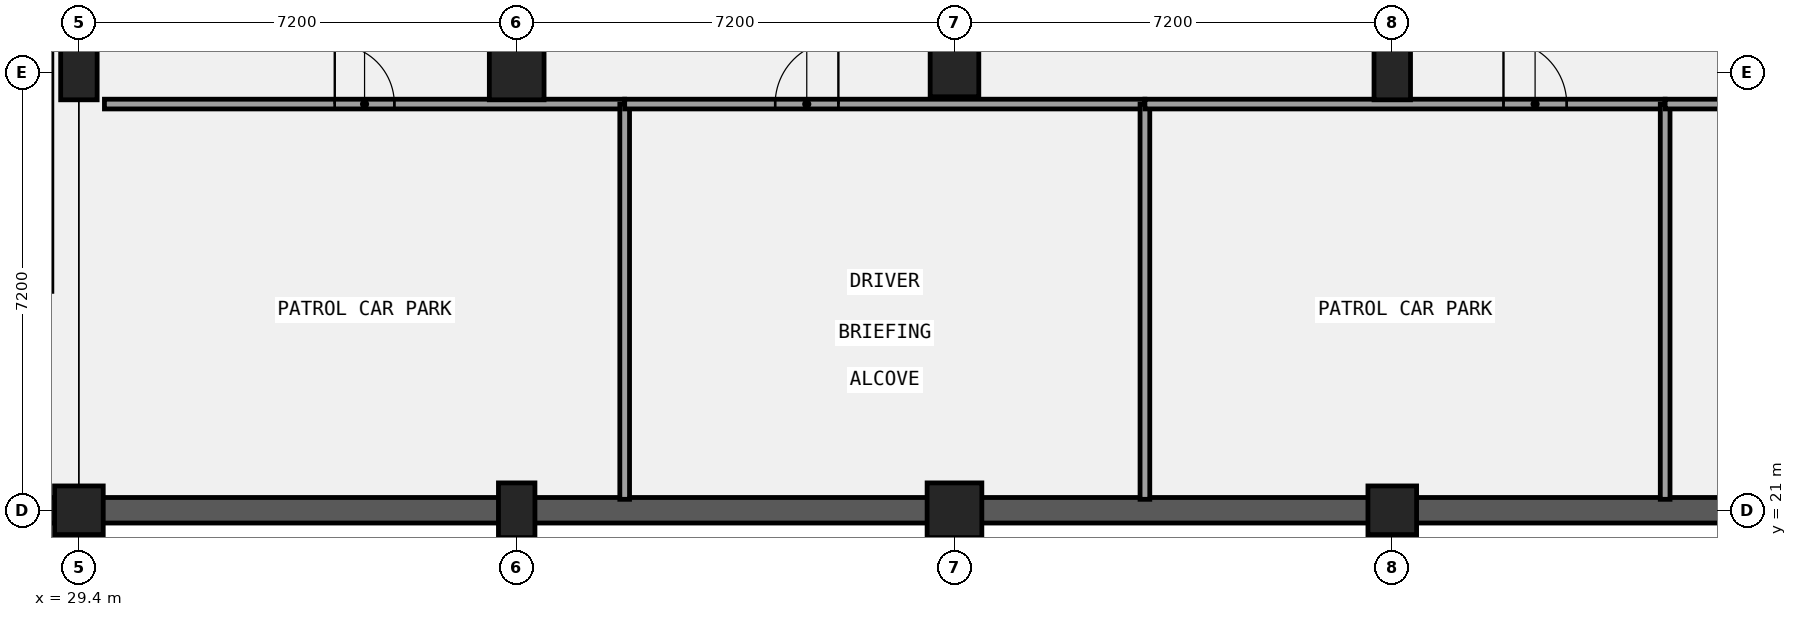
"""IFC4 building model, lengths in metres.
Left out: names, types, materials, properties, quantities, classifications, styles, units other than length and angle.
Written with IfcOpenShell. Run it as: python <this file> out.ifc"""

import sys

from ifc_helpers import new_model, si_unit, direction, frame, frame_2d, origin, origin_2d, place, context, subcontext, project, spatial, rectangle, extrude, element, fill, save


model = new_model("IFC4")
c1 = context("Model", 3, precision=1e-05, world=origin(), true_north=direction((0.0, 1.0)))
c2 = subcontext(c1, "Body", "Model", "MODEL_VIEW")
j1 = project(units=[si_unit("LENGTHUNIT", "METRE"), si_unit("PLANEANGLEUNIT", "RADIAN")], contexts=[c1])
p1 = place(None, origin())
s1 = spatial("IfcSite", under=j1, at=p1, CompositionType="ELEMENT")
p2 = place(p1, origin())
s2 = spatial("IfcBuilding", under=s1, at=p2, CompositionType="ELEMENT")
p3 = place(p2, frame((0.0, 0.0, -4.2)))
s3 = spatial("IfcBuildingStorey", under=s2, at=p3, CompositionType="ELEMENT", Elevation=-4.2)
p4 = place(p3, frame((29.61, 21.0, 0.0), z_axis=(0.0, 0.0, 1.0), x_axis=(-1.0, 0.0, 0.0)))
e1 = element("IfcWall", 1, at=p4, inside=s3, PredefinedType="USERDEFINED", context=c2, shape_type="SweptSolid", body=[
    extrude(rectangle(XDim=22.02, YDim=0.42, at=frame_2d((11.01, 0.0))), origin(), (0.0, 0.0, 1.0), 2.98),
])
p5 = place(p3, frame((144.81, 21.0, 0.0), z_axis=(0.0, 0.0, 1.0), x_axis=(-1.0, 0.0, 0.0)))
e2 = element("IfcWall", 2, at=p5, inside=s3, PredefinedType="USERDEFINED", context=c2, shape_type="SweptSolid", body=[
    extrude(rectangle(XDim=115.62, YDim=0.42, at=frame_2d((57.81, 0.0))), origin(), (0.0, 0.0, 1.0), 2.88),
])
p6 = place(p3, frame((29.4, 21.0, 0.0), z_axis=(0.0, 0.0, 1.0), x_axis=(1.0, 0.0, 0.0)))
e3 = element("IfcColumn", 3, at=p6, inside=s3, PredefinedType="COLUMN", context=c2, shape_type="SweptSolid", body=[
    extrude(rectangle(XDim=0.8, YDim=0.8, at=origin_2d()), origin(), (0.0, 0.0, 1.0), 4.2),
])
for number, where, z_axis, x_axis in (
    (4, (29.4, 28.2, 0.0), (0.0, 0.0, 1.0), (1.0, 0.0, 0.0)),
    (5, (36.6, 21.0, 0.0), (0.0, 0.0, 1.0), (1.0, 0.0, 0.0)),
):
    element("IfcColumn", number, at=place(p3, frame(where, z_axis=z_axis, x_axis=x_axis)), inside=s3, PredefinedType="COLUMN", context=c2, shape_type="SweptSolid", body=[
        extrude(rectangle(XDim=0.6, YDim=0.9, at=origin_2d()), origin(), (0.0, 0.0, 1.0), 4.2),
    ])
for number, where, z_axis, x_axis in (
    (6, (36.6, 28.2, 0.0), (0.0, 0.0, 1.0), (1.0, 0.0, 0.0)),
    (7, (43.8, 21.0, 0.0), (0.0, 0.0, 1.0), (1.0, 0.0, 0.0)),
):
    element("IfcColumn", number, at=place(p3, frame(where, z_axis=z_axis, x_axis=x_axis)), inside=s3, PredefinedType="COLUMN", context=c2, shape_type="SweptSolid", body=[
        extrude(rectangle(XDim=0.9, YDim=0.9, at=origin_2d()), origin(), (0.0, 0.0, 1.0), 4.2),
    ])
for number, where, z_axis, x_axis in (
    (8, (43.8, 28.2, 0.0), (0.0, 0.0, 1.0), (1.0, 0.0, 0.0)),
    (9, (51.0, 21.0, 0.0), (0.0, 0.0, 1.0), (1.0, 0.0, 0.0)),
):
    element("IfcColumn", number, at=place(p3, frame(where, z_axis=z_axis, x_axis=x_axis)), inside=s3, PredefinedType="COLUMN", context=c2, shape_type="SweptSolid", body=[
        extrude(rectangle(XDim=0.8, YDim=0.8, at=origin_2d()), origin(), (0.0, 0.0, 1.0), 4.2),
    ])
p7 = place(p3, frame((51.0, 28.2, 0.0), z_axis=(0.0, 0.0, 1.0), x_axis=(1.0, 0.0, 0.0)))
e10 = element("IfcColumn", 10, at=p7, inside=s3, PredefinedType="COLUMN", context=c2, shape_type="SweptSolid", body=[
    extrude(rectangle(XDim=0.6, YDim=0.9, at=origin_2d()), origin(), (0.0, 0.0, 1.0), 4.2),
])
p8 = place(p3, frame((29.82, 27.68, 0.0), z_axis=(0.0, 0.0, 1.0), x_axis=(1.0, 0.0, 0.0)))
e11 = element("IfcWall", 11, at=p8, inside=s3, PredefinedType="PARTITIONING", context=c2, shape_type="SweptSolid", body=[
    extrude(rectangle(XDim=8.556, YDim=0.16, at=frame_2d((4.278, 0.0))), origin(), (0.0, 0.0, 1.0), 3.88),
])
p9 = place(p8, frame((3.788, 0.0, 0.0)))
e12 = element("IfcOpeningElement", 12, at=p9, cuts=e11, PredefinedType="OPENING", context=c2, shape_type="SweptSolid", body=[
    extrude(rectangle(XDim=0.98, YDim=2.35, at=frame_2d((0.49, 1.175))), frame((0.0, 0.09, 0.0), z_axis=(0.0, -1.0, 0.0), x_axis=(1.0, 0.0, 0.0)), (0.0, 0.0, 1.0), 0.18),
])
p10 = place(p3, frame((38.376, 21.18, 0.0), z_axis=(0.0, 0.0, 1.0), x_axis=(0.0, 1.0, 0.0)))
e13 = element("IfcWall", 13, at=p10, inside=s3, PredefinedType="PARTITIONING", context=c2, shape_type="SweptSolid", body=[
    extrude(rectangle(XDim=6.5, YDim=0.16, at=frame_2d((3.25, 0.0))), origin(), (0.0, 0.0, 1.0), 3.88),
])
p11 = place(p3, frame((38.376, 27.68, 0.0), z_axis=(0.0, 0.0, 1.0), x_axis=(1.0, 0.0, 0.0)))
e14 = element("IfcWall", 14, at=p11, inside=s3, PredefinedType="PARTITIONING", context=c2, shape_type="SweptSolid", body=[
    extrude(rectangle(XDim=8.556, YDim=0.16, at=frame_2d((4.278, 0.0))), origin(), (0.0, 0.0, 1.0), 3.88),
])
p12 = place(p11, frame((2.475, 0.0, 0.0)))
e15 = element("IfcOpeningElement", 15, at=p12, cuts=e14, PredefinedType="OPENING", context=c2, shape_type="SweptSolid", body=[
    extrude(rectangle(XDim=1.04, YDim=2.1, at=frame_2d((0.52, 1.05))), frame((0.0, 0.09, 0.0), z_axis=(0.0, -1.0, 0.0), x_axis=(1.0, 0.0, 0.0)), (0.0, 0.0, 1.0), 0.18),
])
p13 = place(p3, frame((46.932, 21.18, 0.0), z_axis=(0.0, 0.0, 1.0), x_axis=(0.0, 1.0, 0.0)))
e16 = element("IfcWall", 16, at=p13, inside=s3, PredefinedType="PARTITIONING", context=c2, shape_type="SweptSolid", body=[
    extrude(rectangle(XDim=6.5, YDim=0.16, at=frame_2d((3.25, 0.0))), origin(), (0.0, 0.0, 1.0), 3.88),
])
p14 = place(p3, frame((46.932, 27.68, 0.0), z_axis=(0.0, 0.0, 1.0), x_axis=(1.0, 0.0, 0.0)))
e17 = element("IfcWall", 17, at=p14, inside=s3, PredefinedType="PARTITIONING", context=c2, shape_type="SweptSolid", body=[
    extrude(rectangle(XDim=8.556, YDim=0.16, at=frame_2d((4.278, 0.0))), origin(), (0.0, 0.0, 1.0), 3.88),
])
p15 = place(p14, frame((5.897, 0.0, 0.0)))
e18 = element("IfcOpeningElement", 18, at=p15, cuts=e17, PredefinedType="OPENING", context=c2, shape_type="SweptSolid", body=[
    extrude(rectangle(XDim=1.04, YDim=2.22, at=frame_2d((0.52, 1.11))), frame((0.0, 0.09, 0.0), z_axis=(0.0, -1.0, 0.0), x_axis=(1.0, 0.0, 0.0)), (0.0, 0.0, 1.0), 0.18),
])
p16 = place(p3, frame((55.488, 21.18, 0.0), z_axis=(0.0, 0.0, 1.0), x_axis=(0.0, 1.0, 0.0)))
e19 = element("IfcWall", 19, at=p16, inside=s3, PredefinedType="PARTITIONING", context=c2, shape_type="SweptSolid", body=[
    extrude(rectangle(XDim=6.5, YDim=0.16, at=frame_2d((3.25, 0.0))), origin(), (0.0, 0.0, 1.0), 3.88),
])
p17 = place(p3, frame((55.488, 27.68, 0.0), z_axis=(0.0, 0.0, 1.0), x_axis=(1.0, 0.0, 0.0)))
e20 = element("IfcWall", 20, at=p17, inside=s3, PredefinedType="PARTITIONING", context=c2, shape_type="SweptSolid", body=[
    extrude(rectangle(XDim=8.556, YDim=0.16, at=frame_2d((4.278, 0.0))), origin(), (0.0, 0.0, 1.0), 3.88),
])
p18 = place(p17, frame((5.042, 0.0, 0.0)))
e21 = element("IfcOpeningElement", 21, at=p18, cuts=e20, PredefinedType="OPENING", context=c2, shape_type="SweptSolid", body=[
    extrude(rectangle(XDim=1.04, YDim=2.35, at=frame_2d((0.52, 1.175))), frame((0.0, 0.09, 0.0), z_axis=(0.0, -1.0, 0.0), x_axis=(1.0, 0.0, 0.0)), (0.0, 0.0, 1.0), 0.18),
])
p19 = place(p9, frame((0.98, 0.0, 0.0), z_axis=(0.0, 0.0, 1.0), x_axis=(-1.0, 0.0, 0.0)))
e22 = element("IfcDoor", 22, at=p19, inside=s3, OperationType="SINGLE_SWING_LEFT", PredefinedType="DOOR", context=c2, shape_type="SweptSolid", body=[
    extrude(rectangle(XDim=0.98, YDim=2.35, at=frame_2d((0.49, 1.175))), frame((0.0, 0.025, 0.0), z_axis=(0.0, -1.0, 0.0), x_axis=(1.0, 0.0, 0.0)), (0.0, 0.0, 1.0), 0.05),
])
fill(e12, e22)
p20 = place(p12, frame((1.04, 0.0, 0.0), z_axis=(0.0, 0.0, 1.0), x_axis=(-1.0, 0.0, 0.0)))
e23 = element("IfcDoor", 23, at=p20, inside=s3, OperationType="SINGLE_SWING_RIGHT", PredefinedType="DOOR", context=c2, shape_type="SweptSolid", body=[
    extrude(rectangle(XDim=1.04, YDim=2.1, at=frame_2d((0.52, 1.05))), frame((0.0, 0.025, 0.0), z_axis=(0.0, -1.0, 0.0), x_axis=(1.0, 0.0, 0.0)), (0.0, 0.0, 1.0), 0.05),
])
fill(e15, e23)
p21 = place(p15, frame((1.04, 0.0, 0.0), z_axis=(0.0, 0.0, 1.0), x_axis=(-1.0, 0.0, 0.0)))
e24 = element("IfcDoor", 24, at=p21, inside=s3, OperationType="SINGLE_SWING_LEFT", PredefinedType="DOOR", context=c2, shape_type="SweptSolid", body=[
    extrude(rectangle(XDim=1.04, YDim=2.22, at=frame_2d((0.52, 1.11))), frame((0.0, 0.025, 0.0), z_axis=(0.0, -1.0, 0.0), x_axis=(1.0, 0.0, 0.0)), (0.0, 0.0, 1.0), 0.05),
])
fill(e18, e24)
save(model, sys.argv[1])
